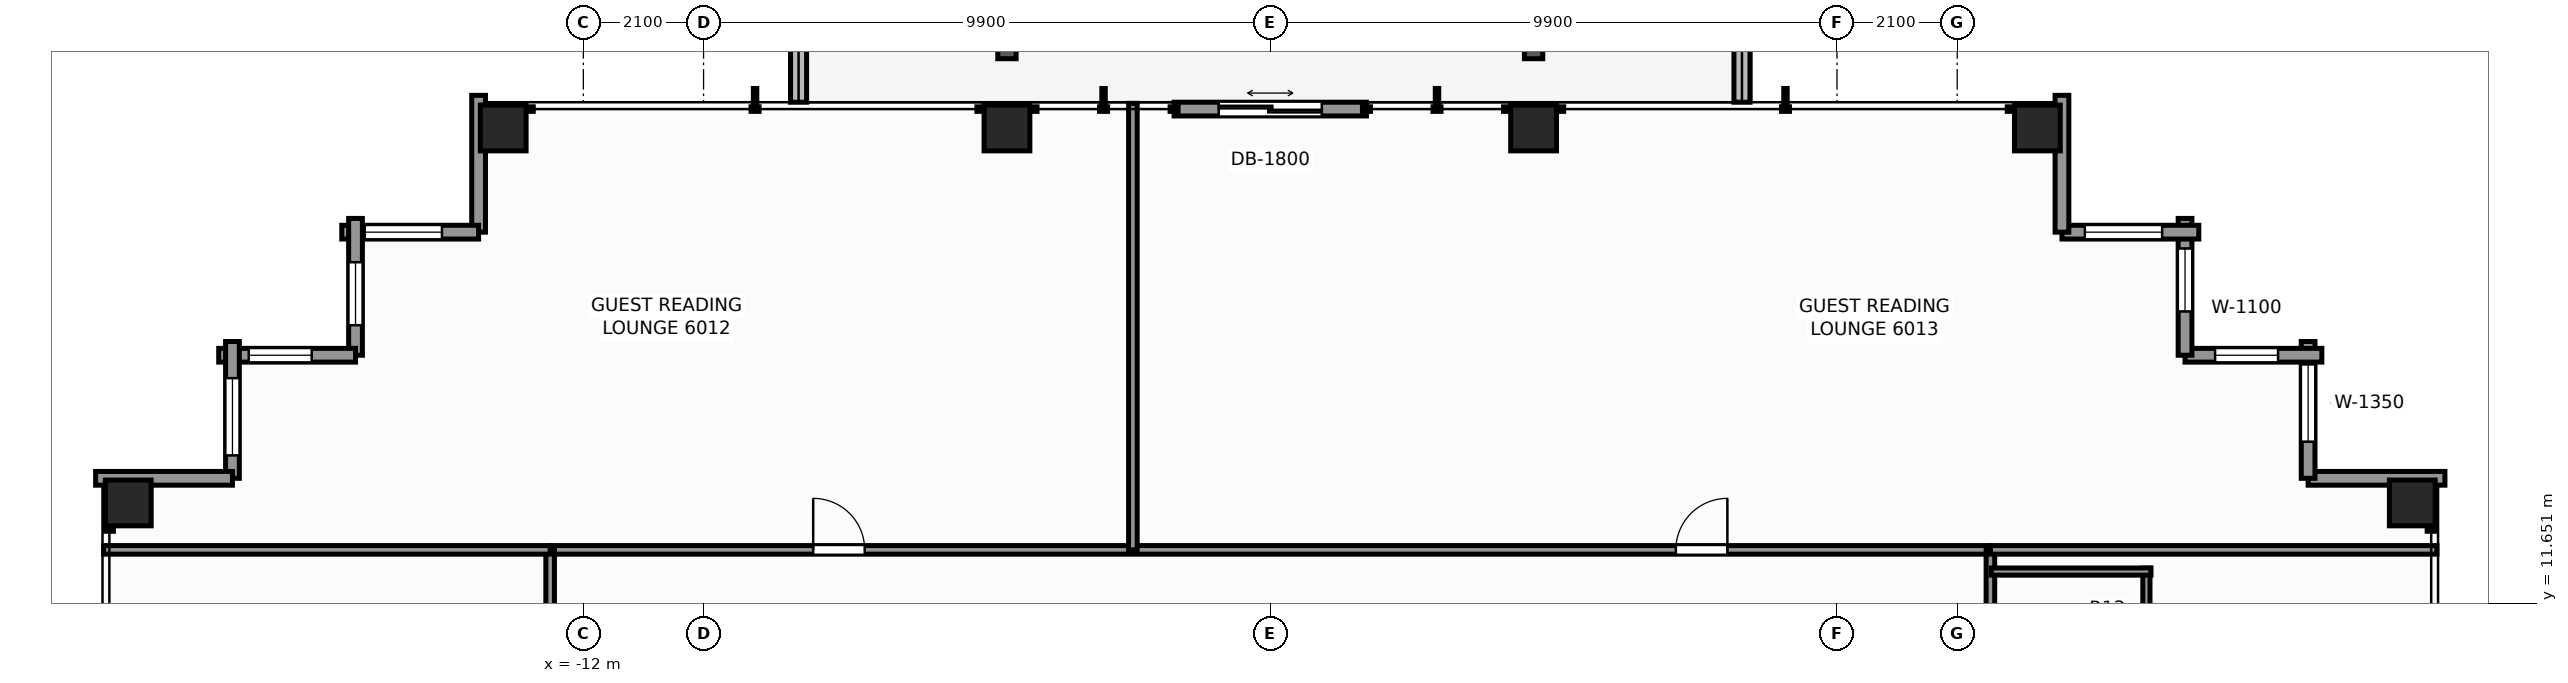
"""IFC4 building model, lengths in metres.
Left out: names, types, materials, properties, quantities, classifications, styles, units other than length and angle.
Written with IfcOpenShell. Run it as: python <this file> out.ifc"""

import sys

from ifc_helpers import new_model, si_unit, direction, frame, frame_2d, origin, origin_2d, place, context, subcontext, project, spatial, rectangle, extrude, element, fill, save


model = new_model("IFC4")
c1 = context("Model", 3, precision=1e-05, world=origin(), true_north=direction((0.0, 1.0)))
c2 = subcontext(c1, "Body", "Model", "MODEL_VIEW")
j1 = project(units=[si_unit("LENGTHUNIT", "METRE"), si_unit("PLANEANGLEUNIT", "RADIAN")], contexts=[c1])
p1 = place(None, origin())
s1 = spatial("IfcSite", under=j1, at=p1, CompositionType="ELEMENT")
p2 = place(p1, origin())
s2 = spatial("IfcBuilding", under=s1, at=p2, CompositionType="ELEMENT")
p3 = place(p2, frame((0.0, 0.0, 206.4)))
s3 = spatial("IfcBuildingStorey", under=s2, at=p3, CompositionType="ELEMENT", Elevation=206.4)
for number, where, z_axis, x_axis in (
    (1, (-13.4, 19.95, 0.0), (0.0, 0.0, 1.0), (1.0, 0.0, 0.0)),
    (2, (-4.6, 19.95, 0.0), (0.0, 0.0, 1.0), (1.0, 0.0, 0.0)),
    (3, (4.6, 19.95, 0.0), (0.0, 0.0, 1.0), (1.0, 0.0, 0.0)),
    (4, (13.4, 19.95, 0.0), (0.0, 0.0, 1.0), (1.0, 0.0, 0.0)),
    (5, (-19.95, 13.4, 0.0), (0.0, 0.0, 1.0), (1.0, 0.0, 0.0)),
    (6, (19.95, 13.4, 0.0), (0.0, 0.0, 1.0), (1.0, 0.0, 0.0)),
):
    element("IfcColumn", number, at=place(p3, frame(where, z_axis=z_axis, x_axis=x_axis)), inside=s3, PredefinedType="COLUMN", context=c2, shape_type="SweptSolid", body=[
        extrude(rectangle(XDim=0.8, YDim=0.8, at=origin_2d()), origin(), (0.0, 0.0, 1.0), 3.3),
    ])
p4 = place(p3, frame((8.24, 20.4, -0.04), z_axis=(0.0, 0.0, 1.0), x_axis=(0.0, 1.0, 0.0)))
e7 = element("IfcWall", 7, at=p4, inside=s3, PredefinedType="PARAPET", context=c2, shape_type="SweptSolid", body=[
    extrude(rectangle(XDim=1.313, YDim=0.28, at=frame_2d((0.656, 0.0))), origin(), (0.0, 0.0, 1.0), 0.42),
])
p5 = place(p3, frame((-8.24, 22.74, -0.04), z_axis=(0.0, 0.0, 1.0), x_axis=(0.0, -1.0, 0.0)))
e8 = element("IfcWall", 8, at=p5, inside=s3, PredefinedType="PARAPET", context=c2, shape_type="SweptSolid", body=[
    extrude(rectangle(XDim=2.34, YDim=0.28, at=frame_2d((1.17, 0.0))), origin(), (0.0, 0.0, 1.0), 0.42),
])
p6 = place(p3, frame((18.13, 13.83, 0.0), z_axis=(0.0, 0.0, 1.0), x_axis=(1.0, 0.0, 0.0)))
e9 = element("IfcWall", 9, at=p6, inside=s3, PredefinedType="STANDARD", context=c2, shape_type="SweptSolid", body=[
    extrude(rectangle(XDim=2.39, YDim=0.24, at=frame_2d((1.195, 0.0))), origin(), (0.0, 0.0, 1.0), 2.463),
])
p7 = place(p3, frame((18.13, 16.22, 0.0), z_axis=(0.0, 0.0, 1.0), x_axis=(0.0, -1.0, 0.0)))
e10 = element("IfcWall", 10, at=p7, inside=s3, PredefinedType="STANDARD", context=c2, shape_type="SweptSolid", body=[
    extrude(rectangle(XDim=2.39, YDim=0.24, at=frame_2d((1.195, 0.0))), origin(), (0.0, 0.0, 1.0), 2.463),
])
p8 = place(p7, frame((0.4, 0.0, 0.65)))
e11 = element("IfcOpeningElement", 11, at=p8, cuts=e10, PredefinedType="OPENING", context=c2, shape_type="SweptSolid", body=[
    extrude(rectangle(XDim=1.35, YDim=1.55, at=frame_2d((0.675, 0.775))), frame((0.0, 0.13, 0.0), z_axis=(0.0, -1.0, 0.0), x_axis=(1.0, 0.0, 0.0)), (0.0, 0.0, 1.0), 0.26),
])
p9 = place(p3, frame((15.98, 15.98, 0.0), z_axis=(0.0, 0.0, 1.0), x_axis=(1.0, 0.0, 0.0)))
e12 = element("IfcWall", 12, at=p9, inside=s3, PredefinedType="STANDARD", context=c2, shape_type="SweptSolid", body=[
    extrude(rectangle(XDim=2.39, YDim=0.24, at=frame_2d((1.195, 0.0))), origin(), (0.0, 0.0, 1.0), 2.463),
])
p10 = place(p9, frame((0.525, 0.0, 0.65)))
e13 = element("IfcOpeningElement", 13, at=p10, cuts=e12, PredefinedType="OPENING", context=c2, shape_type="SweptSolid", body=[
    extrude(rectangle(XDim=1.1, YDim=1.45, at=frame_2d((0.55, 0.725))), frame((0.0, 0.13, 0.0), z_axis=(0.0, -1.0, 0.0), x_axis=(1.0, 0.0, 0.0)), (0.0, 0.0, 1.0), 0.26),
])
p11 = place(p3, frame((15.98, 18.37, 0.0), z_axis=(0.0, 0.0, 1.0), x_axis=(0.0, -1.0, 0.0)))
e14 = element("IfcWall", 14, at=p11, inside=s3, PredefinedType="STANDARD", context=c2, shape_type="SweptSolid", body=[
    extrude(rectangle(XDim=2.39, YDim=0.24, at=frame_2d((1.195, 0.0))), origin(), (0.0, 0.0, 1.0), 2.463),
])
p12 = place(p11, frame((0.525, 0.0, 0.65)))
e15 = element("IfcOpeningElement", 15, at=p12, cuts=e14, PredefinedType="OPENING", context=c2, shape_type="SweptSolid", body=[
    extrude(rectangle(XDim=1.1, YDim=1.45, at=frame_2d((0.55, 0.725))), frame((0.0, 0.13, 0.0), z_axis=(0.0, -1.0, 0.0), x_axis=(1.0, 0.0, 0.0)), (0.0, 0.0, 1.0), 0.26),
])
p13 = place(p3, frame((13.83, 18.13, 0.0), z_axis=(0.0, 0.0, 1.0), x_axis=(1.0, 0.0, 0.0)))
e16 = element("IfcWall", 16, at=p13, inside=s3, PredefinedType="STANDARD", context=c2, shape_type="SweptSolid", body=[
    extrude(rectangle(XDim=2.39, YDim=0.24, at=frame_2d((1.195, 0.0))), origin(), (0.0, 0.0, 1.0), 2.463),
])
p14 = place(p13, frame((0.4, 0.0, 0.65)))
e17 = element("IfcOpeningElement", 17, at=p14, cuts=e16, PredefinedType="OPENING", context=c2, shape_type="SweptSolid", body=[
    extrude(rectangle(XDim=1.35, YDim=1.55, at=frame_2d((0.675, 0.775))), frame((0.0, 0.13, 0.0), z_axis=(0.0, -1.0, 0.0), x_axis=(1.0, 0.0, 0.0)), (0.0, 0.0, 1.0), 0.26),
])
p15 = place(p3, frame((13.83, 20.52, 0.0), z_axis=(0.0, 0.0, 1.0), x_axis=(0.0, -1.0, 0.0)))
e18 = element("IfcWall", 18, at=p15, inside=s3, PredefinedType="STANDARD", context=c2, shape_type="SweptSolid", body=[
    extrude(rectangle(XDim=2.39, YDim=0.24, at=frame_2d((1.195, 0.0))), origin(), (0.0, 0.0, 1.0), 2.463),
])
p16 = place(p3, frame((-1.68, 20.28, 0.0), z_axis=(0.0, 0.0, 1.0), x_axis=(1.0, 0.0, 0.0)))
e19 = element("IfcWall", 19, at=p16, inside=s3, PredefinedType="STANDARD", context=c2, shape_type="SweptSolid", body=[
    extrude(rectangle(XDim=3.36, YDim=0.24, at=frame_2d((1.68, 0.0))), origin(), (0.0, 0.0, 1.0), 3.08),
])
p17 = place(p16, frame((0.78, 0.0, 0.0)))
e20 = element("IfcOpeningElement", 20, at=p17, cuts=e19, PredefinedType="OPENING", context=c2, shape_type="SweptSolid", body=[
    extrude(rectangle(XDim=1.8, YDim=2.2, at=frame_2d((0.9, 1.1))), frame((0.0, 0.13, 0.0), z_axis=(0.0, -1.0, 0.0), x_axis=(1.0, 0.0, 0.0)), (0.0, 0.0, 1.0), 0.26),
])
p18 = place(p3, frame((-13.83, 18.13, 0.0), z_axis=(0.0, 0.0, 1.0), x_axis=(0.0, 1.0, 0.0)))
e21 = element("IfcWall", 21, at=p18, inside=s3, PredefinedType="STANDARD", context=c2, shape_type="SweptSolid", body=[
    extrude(rectangle(XDim=2.39, YDim=0.24, at=frame_2d((1.195, 0.0))), origin(), (0.0, 0.0, 1.0), 2.463),
])
p19 = place(p3, frame((-16.22, 18.13, 0.0), z_axis=(0.0, 0.0, 1.0), x_axis=(1.0, 0.0, 0.0)))
e22 = element("IfcWall", 22, at=p19, inside=s3, PredefinedType="STANDARD", context=c2, shape_type="SweptSolid", body=[
    extrude(rectangle(XDim=2.39, YDim=0.24, at=frame_2d((1.195, 0.0))), origin(), (0.0, 0.0, 1.0), 2.463),
])
p20 = place(p19, frame((0.4, 0.0, 0.65)))
e23 = element("IfcOpeningElement", 23, at=p20, cuts=e22, PredefinedType="OPENING", context=c2, shape_type="SweptSolid", body=[
    extrude(rectangle(XDim=1.35, YDim=1.55, at=frame_2d((0.675, 0.775))), frame((0.0, 0.13, 0.0), z_axis=(0.0, -1.0, 0.0), x_axis=(1.0, 0.0, 0.0)), (0.0, 0.0, 1.0), 0.26),
])
p21 = place(p3, frame((-15.98, 15.98, 0.0), z_axis=(0.0, 0.0, 1.0), x_axis=(0.0, 1.0, 0.0)))
e24 = element("IfcWall", 24, at=p21, inside=s3, PredefinedType="STANDARD", context=c2, shape_type="SweptSolid", body=[
    extrude(rectangle(XDim=2.39, YDim=0.24, at=frame_2d((1.195, 0.0))), origin(), (0.0, 0.0, 1.0), 2.463),
])
p22 = place(p21, frame((0.525, 0.0, 0.65)))
e25 = element("IfcOpeningElement", 25, at=p22, cuts=e24, PredefinedType="OPENING", context=c2, shape_type="SweptSolid", body=[
    extrude(rectangle(XDim=1.1, YDim=1.45, at=frame_2d((0.55, 0.725))), frame((0.0, 0.13, 0.0), z_axis=(0.0, -1.0, 0.0), x_axis=(1.0, 0.0, 0.0)), (0.0, 0.0, 1.0), 0.26),
])
p23 = place(p3, frame((-18.37, 15.98, 0.0), z_axis=(0.0, 0.0, 1.0), x_axis=(1.0, 0.0, 0.0)))
e26 = element("IfcWall", 26, at=p23, inside=s3, PredefinedType="STANDARD", context=c2, shape_type="SweptSolid", body=[
    extrude(rectangle(XDim=2.39, YDim=0.24, at=frame_2d((1.195, 0.0))), origin(), (0.0, 0.0, 1.0), 2.463),
])
p24 = place(p23, frame((0.525, 0.0, 0.65)))
e27 = element("IfcOpeningElement", 27, at=p24, cuts=e26, PredefinedType="OPENING", context=c2, shape_type="SweptSolid", body=[
    extrude(rectangle(XDim=1.1, YDim=1.45, at=frame_2d((0.55, 0.725))), frame((0.0, 0.13, 0.0), z_axis=(0.0, -1.0, 0.0), x_axis=(1.0, 0.0, 0.0)), (0.0, 0.0, 1.0), 0.26),
])
p25 = place(p3, frame((-18.13, 13.83, 0.0), z_axis=(0.0, 0.0, 1.0), x_axis=(0.0, 1.0, 0.0)))
e28 = element("IfcWall", 28, at=p25, inside=s3, PredefinedType="STANDARD", context=c2, shape_type="SweptSolid", body=[
    extrude(rectangle(XDim=2.39, YDim=0.24, at=frame_2d((1.195, 0.0))), origin(), (0.0, 0.0, 1.0), 2.463),
])
p26 = place(p25, frame((0.4, 0.0, 0.65)))
e29 = element("IfcOpeningElement", 29, at=p26, cuts=e28, PredefinedType="OPENING", context=c2, shape_type="SweptSolid", body=[
    extrude(rectangle(XDim=1.35, YDim=1.55, at=frame_2d((0.675, 0.775))), frame((0.0, 0.13, 0.0), z_axis=(0.0, -1.0, 0.0), x_axis=(1.0, 0.0, 0.0)), (0.0, 0.0, 1.0), 0.26),
])
p27 = place(p3, frame((-20.52, 13.83, 0.0), z_axis=(0.0, 0.0, 1.0), x_axis=(1.0, 0.0, 0.0)))
e30 = element("IfcWall", 30, at=p27, inside=s3, PredefinedType="STANDARD", context=c2, shape_type="SweptSolid", body=[
    extrude(rectangle(XDim=2.39, YDim=0.24, at=frame_2d((1.195, 0.0))), origin(), (0.0, 0.0, 1.0), 2.463),
])
p28 = place(p3, frame((-12.58, 12.58, 0.0), z_axis=(0.0, 0.0, 1.0), x_axis=(1.0, 0.0, 0.0)))
e31 = element("IfcWall", 31, at=p28, inside=s3, PredefinedType="PARTITIONING", context=c2, shape_type="SweptSolid", body=[
    extrude(rectangle(XDim=25.16, YDim=0.15, at=frame_2d((12.58, 0.0))), origin(), (0.0, 0.0, 1.0), 2.369),
])
p29 = place(p28, frame((4.595, 0.0, 0.0)))
e32 = element("IfcOpeningElement", 32, at=p29, cuts=e31, PredefinedType="OPENING", context=c2, shape_type="SweptSolid", body=[
    extrude(rectangle(XDim=0.9, YDim=2.06, at=frame_2d((0.45, 1.03))), frame((0.0, 0.085, 0.0), z_axis=(0.0, -1.0, 0.0), x_axis=(1.0, 0.0, 0.0)), (0.0, 0.0, 1.0), 0.17),
])
p30 = place(p28, frame((19.665, 0.0, 0.0)))
e33 = element("IfcOpeningElement", 33, at=p30, cuts=e31, PredefinedType="OPENING", context=c2, shape_type="SweptSolid", body=[
    extrude(rectangle(XDim=0.9, YDim=2.06, at=frame_2d((0.45, 1.03))), frame((0.0, 0.085, 0.0), z_axis=(0.0, -1.0, 0.0), x_axis=(1.0, 0.0, 0.0)), (0.0, 0.0, 1.0), 0.17),
])
p31 = place(p3, frame((-12.58, -12.26, 0.0), z_axis=(0.0, 0.0, 1.0), x_axis=(0.0, 1.0, 0.0)))
e34 = element("IfcWall", 34, at=p31, inside=s3, PredefinedType="PARTITIONING", context=c2, shape_type="SweptSolid", body=[
    extrude(rectangle(XDim=24.84, YDim=0.15, at=frame_2d((12.42, 0.0))), origin(), (0.0, 0.0, 1.0), 2.369),
])
p32 = place(p31, frame((2.686, 0.0, 0.0)))
e35 = element("IfcOpeningElement", 35, at=p32, cuts=e34, PredefinedType="OPENING", context=c2, shape_type="SweptSolid", body=[
    extrude(rectangle(XDim=0.9, YDim=2.06, at=frame_2d((0.45, 1.03))), frame((0.0, 0.085, 0.0), z_axis=(0.0, -1.0, 0.0), x_axis=(1.0, 0.0, 0.0)), (0.0, 0.0, 1.0), 0.17),
])
p33 = place(p31, frame((9.755, 0.0, 0.0)))
e36 = element("IfcOpeningElement", 36, at=p33, cuts=e34, PredefinedType="OPENING", context=c2, shape_type="SweptSolid", body=[
    extrude(rectangle(XDim=0.95, YDim=2.06, at=frame_2d((0.475, 1.03))), frame((0.0, 0.085, 0.0), z_axis=(0.0, -1.0, 0.0), x_axis=(1.0, 0.0, 0.0)), (0.0, 0.0, 1.0), 0.17),
])
p34 = place(p31, frame((19.32, 0.0, 0.0)))
e37 = element("IfcOpeningElement", 37, at=p34, cuts=e34, PredefinedType="OPENING", context=c2, shape_type="SweptSolid", body=[
    extrude(rectangle(XDim=0.95, YDim=2.06, at=frame_2d((0.475, 1.03))), frame((0.0, 0.085, 0.0), z_axis=(0.0, -1.0, 0.0), x_axis=(1.0, 0.0, 0.0)), (0.0, 0.0, 1.0), 0.17),
])
p35 = place(p3, frame((12.58, -12.26, 0.0), z_axis=(0.0, 0.0, 1.0), x_axis=(0.0, 1.0, 0.0)))
e38 = element("IfcWall", 38, at=p35, inside=s3, PredefinedType="PARTITIONING", context=c2, shape_type="SweptSolid", body=[
    extrude(rectangle(XDim=24.84, YDim=0.15, at=frame_2d((12.42, 0.0))), origin(), (0.0, 0.0, 1.0), 2.369),
])
p36 = place(p35, frame((3.373, 0.0, 0.0)))
e39 = element("IfcOpeningElement", 39, at=p36, cuts=e38, PredefinedType="OPENING", context=c2, shape_type="SweptSolid", body=[
    extrude(rectangle(XDim=0.95, YDim=2.06, at=frame_2d((0.475, 1.03))), frame((0.0, 0.085, 0.0), z_axis=(0.0, -1.0, 0.0), x_axis=(1.0, 0.0, 0.0)), (0.0, 0.0, 1.0), 0.17),
])
p37 = place(p35, frame((5.538, 0.0, 0.0)))
e40 = element("IfcOpeningElement", 40, at=p37, cuts=e38, PredefinedType="OPENING", context=c2, shape_type="SweptSolid", body=[
    extrude(rectangle(XDim=0.9, YDim=2.06, at=frame_2d((0.45, 1.03))), frame((0.0, 0.085, 0.0), z_axis=(0.0, -1.0, 0.0), x_axis=(1.0, 0.0, 0.0)), (0.0, 0.0, 1.0), 0.17),
])
p38 = place(p35, frame((13.318, 0.0, 0.0)))
e41 = element("IfcOpeningElement", 41, at=p38, cuts=e38, PredefinedType="OPENING", context=c2, shape_type="SweptSolid", body=[
    extrude(rectangle(XDim=0.95, YDim=2.06, at=frame_2d((0.475, 1.03))), frame((0.0, 0.085, 0.0), z_axis=(0.0, -1.0, 0.0), x_axis=(1.0, 0.0, 0.0)), (0.0, 0.0, 1.0), 0.17),
])
p39 = place(p35, frame((17.724, 0.0, 0.0)))
e42 = element("IfcOpeningElement", 42, at=p39, cuts=e38, PredefinedType="OPENING", context=c2, shape_type="SweptSolid", body=[
    extrude(rectangle(XDim=0.9, YDim=2.06, at=frame_2d((0.45, 1.03))), frame((0.0, 0.085, 0.0), z_axis=(0.0, -1.0, 0.0), x_axis=(1.0, 0.0, 0.0)), (0.0, 0.0, 1.0), 0.17),
])
p40 = place(p35, frame((20.0, 0.0, 0.0)))
e43 = element("IfcOpeningElement", 43, at=p40, cuts=e38, PredefinedType="OPENING", context=c2, shape_type="SweptSolid", body=[
    extrude(rectangle(XDim=0.95, YDim=2.06, at=frame_2d((0.475, 1.03))), frame((0.0, 0.085, 0.0), z_axis=(0.0, -1.0, 0.0), x_axis=(1.0, 0.0, 0.0)), (0.0, 0.0, 1.0), 0.17),
])
for number, where, z_axis, x_axis in (
    (44, (-20.38, 12.58, 0.0), (0.0, 0.0, 1.0), (1.0, 0.0, 0.0)),
    (45, (12.58, 12.58, 0.0), (0.0, 0.0, 1.0), (1.0, 0.0, 0.0)),
):
    element("IfcWall", number, at=place(p3, frame(where, z_axis=z_axis, x_axis=x_axis)), inside=s3, PredefinedType="PARTITIONING", context=c2, shape_type="SweptSolid", body=[
        extrude(rectangle(XDim=7.8, YDim=0.15, at=frame_2d((3.9, 0.0))), origin(), (0.0, 0.0, 1.0), 2.369),
    ])
p41 = place(p3, frame((15.305, 9.891, 0.0), z_axis=(0.0, 0.0, 1.0), x_axis=(0.0, 1.0, 0.0)))
e46 = element("IfcWall", 46, at=p41, inside=s3, PredefinedType="PARTITIONING", context=c2, shape_type="SweptSolid", body=[
    extrude(rectangle(XDim=2.37, YDim=0.125, at=frame_2d((1.185, 0.0))), origin(), (0.0, 0.0, 1.0), 2.369),
])
p42 = place(p3, frame((12.595, 12.201, 0.0), z_axis=(0.0, 0.0, 1.0), x_axis=(1.0, 0.0, 0.0)))
e47 = element("IfcWall", 47, at=p42, inside=s3, PredefinedType="PARTITIONING", context=c2, shape_type="SweptSolid", body=[
    extrude(rectangle(XDim=2.79, YDim=0.125, at=frame_2d((1.395, 0.0))), origin(), (0.0, 0.0, 1.0), 3.08),
])
p43 = place(p3, frame((-2.4, 12.58, 0.0), z_axis=(0.0, 0.0, 1.0), x_axis=(0.0, 1.0, 0.0)))
e48 = element("IfcWall", 48, at=p43, inside=s3, PredefinedType="PARTITIONING", context=c2, shape_type="SweptSolid", body=[
    extrude(rectangle(XDim=7.8, YDim=0.15, at=frame_2d((3.9, 0.0))), origin(), (0.0, 0.0, 1.0), 2.453),
])
p44 = place(p8, origin())
e49 = element("IfcWindow", 49, at=p44, inside=s3, PartitioningType="SINGLE_PANEL", PredefinedType="WINDOW", context=c2, shape_type="SweptSolid", body=[
    extrude(rectangle(XDim=1.35, YDim=1.55, at=frame_2d((0.675, 0.775))), frame((0.0, 0.03, 0.0), z_axis=(0.0, -1.0, 0.0), x_axis=(1.0, 0.0, 0.0)), (0.0, 0.0, 1.0), 0.06),
])
fill(e11, e49)
p45 = place(p10, origin())
e50 = element("IfcWindow", 50, at=p45, inside=s3, PartitioningType="SINGLE_PANEL", PredefinedType="WINDOW", context=c2, shape_type="SweptSolid", body=[
    extrude(rectangle(XDim=1.1, YDim=1.45, at=frame_2d((0.55, 0.725))), frame((0.0, 0.03, 0.0), z_axis=(0.0, -1.0, 0.0), x_axis=(1.0, 0.0, 0.0)), (0.0, 0.0, 1.0), 0.06),
])
fill(e13, e50)
p46 = place(p12, origin())
e51 = element("IfcWindow", 51, at=p46, inside=s3, PartitioningType="SINGLE_PANEL", PredefinedType="WINDOW", context=c2, shape_type="SweptSolid", body=[
    extrude(rectangle(XDim=1.1, YDim=1.45, at=frame_2d((0.55, 0.725))), frame((0.0, 0.03, 0.0), z_axis=(0.0, -1.0, 0.0), x_axis=(1.0, 0.0, 0.0)), (0.0, 0.0, 1.0), 0.06),
])
fill(e15, e51)
p47 = place(p14, origin())
e52 = element("IfcWindow", 52, at=p47, inside=s3, PartitioningType="SINGLE_PANEL", PredefinedType="WINDOW", context=c2, shape_type="SweptSolid", body=[
    extrude(rectangle(XDim=1.35, YDim=1.55, at=frame_2d((0.675, 0.775))), frame((0.0, 0.03, 0.0), z_axis=(0.0, -1.0, 0.0), x_axis=(1.0, 0.0, 0.0)), (0.0, 0.0, 1.0), 0.06),
])
fill(e17, e52)
p48 = place(p17, origin())
e53 = element("IfcDoor", 53, at=p48, inside=s3, OperationType="DOUBLE_DOOR_SLIDING", PredefinedType="DOOR", context=c2, shape_type="SweptSolid", body=[
    extrude(rectangle(XDim=1.8, YDim=2.2, at=frame_2d((0.9, 1.1))), frame((0.0, 0.025, 0.0), z_axis=(0.0, -1.0, 0.0), x_axis=(1.0, 0.0, 0.0)), (0.0, 0.0, 1.0), 0.05),
])
fill(e20, e53)
p49 = place(p20, origin())
e54 = element("IfcWindow", 54, at=p49, inside=s3, PartitioningType="SINGLE_PANEL", PredefinedType="WINDOW", context=c2, shape_type="SweptSolid", body=[
    extrude(rectangle(XDim=1.35, YDim=1.55, at=frame_2d((0.675, 0.775))), frame((0.0, 0.03, 0.0), z_axis=(0.0, -1.0, 0.0), x_axis=(1.0, 0.0, 0.0)), (0.0, 0.0, 1.0), 0.06),
])
fill(e23, e54)
p50 = place(p22, origin())
e55 = element("IfcWindow", 55, at=p50, inside=s3, PartitioningType="SINGLE_PANEL", PredefinedType="WINDOW", context=c2, shape_type="SweptSolid", body=[
    extrude(rectangle(XDim=1.1, YDim=1.45, at=frame_2d((0.55, 0.725))), frame((0.0, 0.03, 0.0), z_axis=(0.0, -1.0, 0.0), x_axis=(1.0, 0.0, 0.0)), (0.0, 0.0, 1.0), 0.06),
])
fill(e25, e55)
p51 = place(p24, origin())
e56 = element("IfcWindow", 56, at=p51, inside=s3, PartitioningType="SINGLE_PANEL", PredefinedType="WINDOW", context=c2, shape_type="SweptSolid", body=[
    extrude(rectangle(XDim=1.1, YDim=1.45, at=frame_2d((0.55, 0.725))), frame((0.0, 0.03, 0.0), z_axis=(0.0, -1.0, 0.0), x_axis=(1.0, 0.0, 0.0)), (0.0, 0.0, 1.0), 0.06),
])
fill(e27, e56)
p52 = place(p26, origin())
e57 = element("IfcWindow", 57, at=p52, inside=s3, PartitioningType="SINGLE_PANEL", PredefinedType="WINDOW", context=c2, shape_type="SweptSolid", body=[
    extrude(rectangle(XDim=1.35, YDim=1.55, at=frame_2d((0.675, 0.775))), frame((0.0, 0.03, 0.0), z_axis=(0.0, -1.0, 0.0), x_axis=(1.0, 0.0, 0.0)), (0.0, 0.0, 1.0), 0.06),
])
fill(e29, e57)
p53 = place(p29, origin())
e58 = element("IfcDoor", 58, at=p53, inside=s3, OperationType="SINGLE_SWING_LEFT", PredefinedType="DOOR", context=c2, shape_type="SweptSolid", body=[
    extrude(rectangle(XDim=0.9, YDim=2.06, at=frame_2d((0.45, 1.03))), frame((0.0, 0.025, 0.0), z_axis=(0.0, -1.0, 0.0), x_axis=(1.0, 0.0, 0.0)), (0.0, 0.0, 1.0), 0.05),
])
fill(e32, e58)
p54 = place(p30, origin())
e59 = element("IfcDoor", 59, at=p54, inside=s3, OperationType="SINGLE_SWING_RIGHT", PredefinedType="DOOR", context=c2, shape_type="SweptSolid", body=[
    extrude(rectangle(XDim=0.9, YDim=2.06, at=frame_2d((0.45, 1.03))), frame((0.0, 0.025, 0.0), z_axis=(0.0, -1.0, 0.0), x_axis=(1.0, 0.0, 0.0)), (0.0, 0.0, 1.0), 0.05),
])
fill(e33, e59)
save(model, sys.argv[1])
